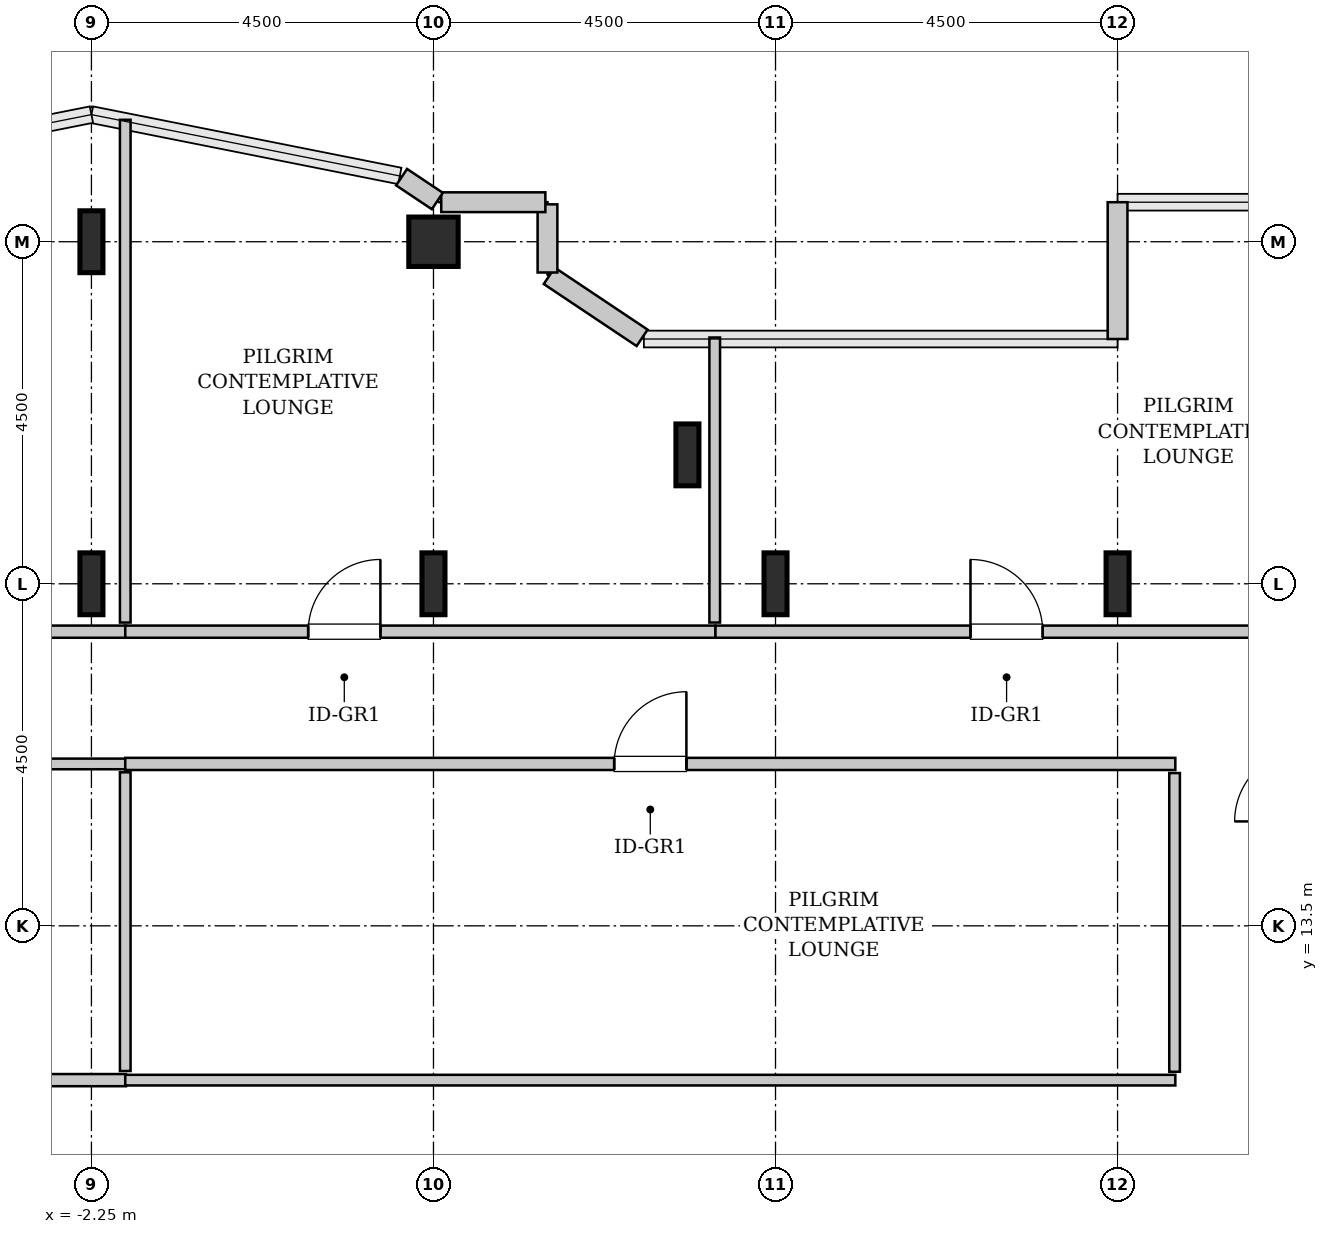
"""IFC4 building model, lengths in metres.
Left out: names, types, materials, properties, quantities, classifications, styles, units other than length and angle.
Written with IfcOpenShell. Run it as: python <this file> out.ifc"""

import sys

from ifc_helpers import new_model, si_unit, direction, frame, frame_2d, origin, origin_2d, place, context, subcontext, project, spatial, rectangle, hollow_rectangle, i_section, extrude, source, transform, mapped, element, fill, save


model = new_model("IFC4")
c1 = context("Model", 3, precision=1e-05, world=origin(), true_north=direction((0.0, 1.0)))
c2 = subcontext(c1, "Body", "Model", "MODEL_VIEW")
j1 = project(units=[si_unit("LENGTHUNIT", "METRE"), si_unit("PLANEANGLEUNIT", "RADIAN")], contexts=[c1])
p1 = place(None, origin())
s1 = spatial("IfcSite", under=j1, at=p1, CompositionType="ELEMENT")
p2 = place(p1, origin())
s2 = spatial("IfcBuilding", under=s1, at=p2, CompositionType="ELEMENT")
p3 = place(p2, frame((0.0, 0.0, 221.8)))
s3 = spatial("IfcBuildingStorey", under=s2, at=p3, CompositionType="ELEMENT", Elevation=221.8)
m1 = source(origin(), c2, "Body", "SweptSolid", [
    extrude(i_section(OverallWidth=0.303, OverallDepth=0.814, WebThickness=0.021, FlangeThickness=0.04, FilletRadius=0.03, at=origin_2d()), origin(), (0.0, 0.0, 1.0), 3.8),
])
for number, where, z_axis, x_axis in (
    (1, (-2.25, 18.0, 0.0), (0.0, 0.0, 1.0), (1.0, 0.0, 0.0)),
    (2, (-2.25, 22.5, 0.0), (0.0, 0.0, 1.0), (1.0, 0.0, 0.0)),
    (3, (2.25, 18.0, 0.0), (0.0, 0.0, 1.0), (1.0, 0.0, 0.0)),
):
    element("IfcColumn", number, at=place(p3, frame(where, z_axis=z_axis, x_axis=x_axis)), inside=s3, PredefinedType="COLUMN", context=c2, shape_type="MappedRepresentation", body=[
        mapped(m1, transform((0.0, 0.0, 0.0), x_axis=(1.0, 0.0, 0.0), y_axis=(0.0, 1.0, 0.0), z_axis=(0.0, 0.0, 1.0), scale=1.0)),
    ])
m2 = source(origin(), c2, "Body", "SweptSolid", [
    extrude(hollow_rectangle(XDim=0.65, YDim=0.65, WallThickness=0.032, InnerFilletRadius=0.032, OuterFilletRadius=0.064, at=origin_2d()), origin(), (0.0, 0.0, 1.0), 3.8),
])
p4 = place(p3, frame((2.25, 22.5, 0.0), z_axis=(0.0, 0.0, 1.0), x_axis=(1.0, 0.0, 0.0)))
e4 = element("IfcColumn", 4, at=p4, inside=s3, PredefinedType="COLUMN", context=c2, shape_type="MappedRepresentation", body=[
    mapped(m2, transform((0.0, 0.0, 0.0), x_axis=(1.0, 0.0, 0.0), y_axis=(0.0, 1.0, 0.0), z_axis=(0.0, 0.0, 1.0), scale=1.0)),
])
for number, where, z_axis, x_axis in (
    (5, (5.591, 19.696, 0.0), (0.0, 0.0, 1.0), (1.0, 0.0, 0.0)),
    (6, (6.75, 18.0, 0.0), (0.0, 0.0, 1.0), (1.0, 0.0, 0.0)),
    (7, (11.25, 18.0, 0.0), (0.0, 0.0, 1.0), (1.0, 0.0, 0.0)),
):
    element("IfcColumn", number, at=place(p3, frame(where, z_axis=z_axis, x_axis=x_axis)), inside=s3, PredefinedType="COLUMN", context=c2, shape_type="MappedRepresentation", body=[
        mapped(m1, transform((0.0, 0.0, 0.0), x_axis=(1.0, 0.0, 0.0), y_axis=(0.0, 1.0, 0.0), z_axis=(0.0, 0.0, 1.0), scale=1.0)),
    ])
m3 = source(origin(), c2, "Body", "SweptSolid", [
    extrude(rectangle(XDim=1.8, YDim=0.26, at=frame_2d((0.9, 0.0))), origin(), (0.0, 0.0, 1.0), 3.55),
])
p5 = place(p3, frame((11.25, 23.02, 0.0), z_axis=(0.0, 0.0, 1.0), x_axis=(0.0, -1.0, 0.0)))
e8 = element("IfcWall", 8, at=p5, inside=s3, PredefinedType="SOLIDWALL", context=c2, shape_type="MappedRepresentation", body=[
    mapped(m3, transform((0.0, 0.0, 0.0), x_axis=(1.0, 0.0, 0.0), y_axis=(0.0, 1.0, 0.0), z_axis=(0.0, 0.0, 1.0), scale=1.0)),
])
m4 = source(origin(), c2, "Body", "SweptSolid", [
    extrude(rectangle(XDim=1.469, YDim=0.26, at=frame_2d((0.734, 0.0))), origin(), (0.0, 0.0, 1.0), 3.55),
])
p6 = place(p3, frame((4.995, 21.236, 0.0), z_axis=(0.0, 0.0, 1.0), x_axis=(-0.831461760506, 0.555581983884, 0.0)))
e9 = element("IfcWall", 9, at=p6, inside=s3, PredefinedType="SOLIDWALL", context=c2, shape_type="MappedRepresentation", body=[
    mapped(m4, transform((0.0, 0.0, 0.0), x_axis=(1.0, 0.0, 0.0), y_axis=(0.0, 1.0, 0.0), z_axis=(0.0, 0.0, 1.0), scale=1.0)),
])
m5 = source(origin(), c2, "Body", "SweptSolid", [
    extrude(rectangle(XDim=0.897, YDim=0.26, at=frame_2d((0.448, 0.0))), origin(), (0.0, 0.0, 1.0), 3.55),
])
p7 = place(p3, frame((3.75, 22.095, 0.0), z_axis=(0.0, 0.0, 1.0), x_axis=(0.0, 1.0, 0.0)))
e10 = element("IfcWall", 10, at=p7, inside=s3, PredefinedType="SOLIDWALL", context=c2, shape_type="MappedRepresentation", body=[
    mapped(m5, transform((0.0, 0.0, 0.0), x_axis=(1.0, 0.0, 0.0), y_axis=(0.0, 1.0, 0.0), z_axis=(0.0, 0.0, 1.0), scale=1.0)),
])
m6 = source(origin(), c2, "Body", "SweptSolid", [
    extrude(rectangle(XDim=1.37, YDim=0.26, at=frame_2d((0.685, 0.0))), origin(), (0.0, 0.0, 1.0), 3.55),
])
p8 = place(p3, frame((3.722, 23.02, 0.0), z_axis=(0.0, 0.0, 1.0), x_axis=(-1.0, 0.0, 0.0)))
e11 = element("IfcWall", 11, at=p8, inside=s3, PredefinedType="SOLIDWALL", context=c2, shape_type="MappedRepresentation", body=[
    mapped(m6, transform((0.0, 0.0, 0.0), x_axis=(1.0, 0.0, 0.0), y_axis=(0.0, 1.0, 0.0), z_axis=(0.0, 0.0, 1.0), scale=1.0)),
])
m7 = source(origin(), c2, "Body", "SweptSolid", [
    extrude(rectangle(XDim=0.565, YDim=0.26, at=frame_2d((0.283, 0.0))), origin(), (0.0, 0.0, 1.0), 3.55),
])
p9 = place(p3, frame((2.301, 23.036, 0.0), z_axis=(0.0, 0.0, 1.0), x_axis=(-0.831651492666, 0.555297933317, 0.0)))
e12 = element("IfcWall", 12, at=p9, inside=s3, PredefinedType="SOLIDWALL", context=c2, shape_type="MappedRepresentation", body=[
    mapped(m7, transform((0.0, 0.0, 0.0), x_axis=(1.0, 0.0, 0.0), y_axis=(0.0, 1.0, 0.0), z_axis=(0.0, 0.0, 1.0), scale=1.0)),
])
m8 = source(origin(), c2, "Body", "SweptSolid", [
    extrude(rectangle(XDim=10.215, YDim=0.16, at=frame_2d((5.107, 0.0))), origin(), (0.0, 0.0, 1.0), 3.535),
])
p10 = place(p3, frame((-12.01, 11.47, 0.0), z_axis=(0.0, 0.0, 1.0), x_axis=(1.0, 0.0, 0.0)))
e13 = element("IfcWall", 13, at=p10, inside=s3, PredefinedType="PARTITIONING", context=c2, shape_type="MappedRepresentation", body=[
    mapped(m8, transform((0.0, 0.0, 0.0), x_axis=(1.0, 0.0, 0.0), y_axis=(0.0, 1.0, 0.0), z_axis=(0.0, 0.0, 1.0), scale=1.0)),
])
p11 = place(p10, frame((4.633, 0.0, 0.0)))
e14 = element("IfcOpeningElement", 14, at=p11, cuts=e13, PredefinedType="OPENING", context=c2, shape_type="SweptSolid", body=[
    extrude(rectangle(XDim=0.95, YDim=2.1, at=frame_2d((0.475, 1.05))), frame((0.0, 0.09, 0.0), z_axis=(0.0, -1.0, 0.0), x_axis=(1.0, 0.0, 0.0)), (0.0, 0.0, 1.0), 0.18),
])
m9 = source(origin(), c2, "Body", "SweptSolid", [
    extrude(rectangle(XDim=10.215, YDim=0.14, at=frame_2d((5.107, 0.0))), origin(), (0.0, 0.0, 1.0), 3.535),
])
p12 = place(p3, frame((-12.01, 15.63, 0.0), z_axis=(0.0, 0.0, 1.0), x_axis=(1.0, 0.0, 0.0)))
e15 = element("IfcWall", 15, at=p12, inside=s3, PredefinedType="PARTITIONING", context=c2, shape_type="MappedRepresentation", body=[
    mapped(m9, transform((0.0, 0.0, 0.0), x_axis=(1.0, 0.0, 0.0), y_axis=(0.0, 1.0, 0.0), z_axis=(0.0, 0.0, 1.0), scale=1.0)),
])
m10 = source(origin(), c2, "Body", "SweptSolid", [
    extrude(rectangle(XDim=3.93, YDim=0.14, at=frame_2d((1.965, 0.0))), origin(), (0.0, 0.0, 1.0), 3.535),
])
p13 = place(p3, frame((-1.805, 11.59, 0.0), z_axis=(0.0, 0.0, 1.0), x_axis=(0.0, 1.0, 0.0)))
e16 = element("IfcWall", 16, at=p13, inside=s3, PredefinedType="PARTITIONING", context=c2, shape_type="MappedRepresentation", body=[
    mapped(m10, transform((0.0, 0.0, 0.0), x_axis=(1.0, 0.0, 0.0), y_axis=(0.0, 1.0, 0.0), z_axis=(0.0, 0.0, 1.0), scale=1.0)),
])
m11 = source(origin(), c2, "Body", "SweptSolid", [
    extrude(rectangle(XDim=5.645, YDim=0.16, at=frame_2d((2.823, 0.0))), origin(), (0.0, 0.0, 1.0), 3.535),
])
p14 = place(p3, frame((-7.44, 17.37, 0.0), z_axis=(0.0, 0.0, 1.0), x_axis=(1.0, 0.0, 0.0)))
e17 = element("IfcWall", 17, at=p14, inside=s3, PredefinedType="PARTITIONING", context=c2, shape_type="MappedRepresentation", body=[
    mapped(m11, transform((0.0, 0.0, 0.0), x_axis=(1.0, 0.0, 0.0), y_axis=(0.0, 1.0, 0.0), z_axis=(0.0, 0.0, 1.0), scale=1.0)),
])
p15 = place(p14, frame((2.347, 0.0, 0.0)))
e18 = element("IfcOpeningElement", 18, at=p15, cuts=e17, PredefinedType="OPENING", context=c2, shape_type="SweptSolid", body=[
    extrude(rectangle(XDim=0.95, YDim=2.1, at=frame_2d((0.475, 1.05))), frame((0.0, 0.09, 0.0), z_axis=(0.0, -1.0, 0.0), x_axis=(1.0, 0.0, 0.0)), (0.0, 0.0, 1.0), 0.18),
])
m12 = source(origin(), c2, "Body", "SweptSolid", [
    extrude(rectangle(XDim=6.614, YDim=0.14, at=frame_2d((3.307, 0.0))), origin(), (0.0, 0.0, 1.0), 2.925),
])
p16 = place(p3, frame((-1.805, 17.49, 0.0), z_axis=(0.0, 0.0, 1.0), x_axis=(0.0, 1.0, 0.0)))
e19 = element("IfcWall", 19, at=p16, inside=s3, PredefinedType="PARTITIONING", context=c2, shape_type="MappedRepresentation", body=[
    mapped(m12, transform((0.0, 0.0, 0.0), x_axis=(1.0, 0.0, 0.0), y_axis=(0.0, 1.0, 0.0), z_axis=(0.0, 0.0, 1.0), scale=1.0)),
])
m13 = source(origin(), c2, "Body", "SweptSolid", [
    extrude(rectangle(XDim=7.765, YDim=0.16, at=frame_2d((3.882, 0.0))), origin(), (0.0, 0.0, 1.0), 3.535),
])
p17 = place(p3, frame((-1.805, 17.37, 0.0), z_axis=(0.0, 0.0, 1.0), x_axis=(1.0, 0.0, 0.0)))
e20 = element("IfcWall", 20, at=p17, inside=s3, PredefinedType="PARTITIONING", context=c2, shape_type="MappedRepresentation", body=[
    mapped(m13, transform((0.0, 0.0, 0.0), x_axis=(1.0, 0.0, 0.0), y_axis=(0.0, 1.0, 0.0), z_axis=(0.0, 0.0, 1.0), scale=1.0)),
])
p18 = place(p17, frame((2.407, 0.0, 0.0)))
e21 = element("IfcOpeningElement", 21, at=p18, cuts=e20, PredefinedType="OPENING", context=c2, shape_type="SweptSolid", body=[
    extrude(rectangle(XDim=0.95, YDim=2.1, at=frame_2d((0.475, 1.05))), frame((0.0, 0.09, 0.0), z_axis=(0.0, -1.0, 0.0), x_axis=(1.0, 0.0, 0.0)), (0.0, 0.0, 1.0), 0.18),
])
m14 = source(origin(), c2, "Body", "SweptSolid", [
    extrude(rectangle(XDim=3.75, YDim=0.14, at=frame_2d((1.875, 0.0))), origin(), (0.0, 0.0, 1.0), 3.535),
])
p19 = place(p3, frame((5.95, 17.49, 0.0), z_axis=(0.0, 0.0, 1.0), x_axis=(0.0, 1.0, 0.0)))
e22 = element("IfcWall", 22, at=p19, inside=s3, PredefinedType="PARTITIONING", context=c2, shape_type="MappedRepresentation", body=[
    mapped(m14, transform((0.0, 0.0, 0.0), x_axis=(1.0, 0.0, 0.0), y_axis=(0.0, 1.0, 0.0), z_axis=(0.0, 0.0, 1.0), scale=1.0)),
])
m15 = source(origin(), c2, "Body", "SweptSolid", [
    extrude(rectangle(XDim=7.66, YDim=0.16, at=frame_2d((3.83, 0.0))), origin(), (0.0, 0.0, 1.0), 3.535),
])
p20 = place(p3, frame((5.96, 17.37, 0.0), z_axis=(0.0, 0.0, 1.0), x_axis=(1.0, 0.0, 0.0)))
e23 = element("IfcWall", 23, at=p20, inside=s3, PredefinedType="PARTITIONING", context=c2, shape_type="MappedRepresentation", body=[
    mapped(m15, transform((0.0, 0.0, 0.0), x_axis=(1.0, 0.0, 0.0), y_axis=(0.0, 1.0, 0.0), z_axis=(0.0, 0.0, 1.0), scale=1.0)),
])
p21 = place(p20, frame((3.355, 0.0, 0.0)))
e24 = element("IfcOpeningElement", 24, at=p21, cuts=e23, PredefinedType="OPENING", context=c2, shape_type="SweptSolid", body=[
    extrude(rectangle(XDim=0.95, YDim=2.1, at=frame_2d((0.475, 1.05))), frame((0.0, 0.09, 0.0), z_axis=(0.0, -1.0, 0.0), x_axis=(1.0, 0.0, 0.0)), (0.0, 0.0, 1.0), 0.18),
])
m16 = source(origin(), c2, "Body", "SweptSolid", [
    extrude(rectangle(XDim=13.815, YDim=0.16, at=frame_2d((6.907, 0.0))), origin(), (0.0, 0.0, 1.0), 3.535),
])
p22 = place(p3, frame((-1.805, 15.63, 0.0), z_axis=(0.0, 0.0, 1.0), x_axis=(1.0, 0.0, 0.0)))
e25 = element("IfcWall", 25, at=p22, inside=s3, PredefinedType="PARTITIONING", context=c2, shape_type="MappedRepresentation", body=[
    mapped(m16, transform((0.0, 0.0, 0.0), x_axis=(1.0, 0.0, 0.0), y_axis=(0.0, 1.0, 0.0), z_axis=(0.0, 0.0, 1.0), scale=1.0)),
])
p23 = place(p22, frame((6.433, 0.0, 0.0)))
e26 = element("IfcOpeningElement", 26, at=p23, cuts=e25, PredefinedType="OPENING", context=c2, shape_type="SweptSolid", body=[
    extrude(rectangle(XDim=0.95, YDim=2.1, at=frame_2d((0.475, 1.05))), frame((0.0, 0.09, 0.0), z_axis=(0.0, -1.0, 0.0), x_axis=(1.0, 0.0, 0.0)), (0.0, 0.0, 1.0), 0.18),
])
m17 = source(origin(), c2, "Body", "SweptSolid", [
    extrude(rectangle(XDim=13.815, YDim=0.14, at=frame_2d((6.907, 0.0))), origin(), (0.0, 0.0, 1.0), 3.535),
])
p24 = place(p3, frame((-1.805, 11.47, 0.0), z_axis=(0.0, 0.0, 1.0), x_axis=(1.0, 0.0, 0.0)))
e27 = element("IfcWall", 27, at=p24, inside=s3, PredefinedType="PARTITIONING", context=c2, shape_type="MappedRepresentation", body=[
    mapped(m17, transform((0.0, 0.0, 0.0), x_axis=(1.0, 0.0, 0.0), y_axis=(0.0, 1.0, 0.0), z_axis=(0.0, 0.0, 1.0), scale=1.0)),
])
p25 = place(p3, frame((12.0, 11.58, 0.0), z_axis=(0.0, 0.0, 1.0), x_axis=(0.0, 1.0, 0.0)))
e28 = element("IfcWall", 28, at=p25, inside=s3, PredefinedType="PARTITIONING", context=c2, shape_type="MappedRepresentation", body=[
    mapped(m10, transform((0.0, 0.0, 0.0), x_axis=(1.0, 0.0, 0.0), y_axis=(0.0, 1.0, 0.0), z_axis=(0.0, 0.0, 1.0), scale=1.0)),
])
m18 = source(origin(), c2, "Body", "SweptSolid", [
    extrude(rectangle(XDim=0.95, YDim=2.1, at=frame_2d((0.475, 1.05))), frame((0.0, 0.025, 0.0), z_axis=(0.0, -1.0, 0.0), x_axis=(1.0, 0.0, 0.0)), (0.0, 0.0, 1.0), 0.05),
])
p26 = place(p18, origin())
e29 = element("IfcDoor", 29, at=p26, inside=s3, OperationType="SINGLE_SWING_RIGHT", PredefinedType="DOOR", context=c2, shape_type="MappedRepresentation", body=[
    mapped(m18, transform((0.0, 0.0, 0.0), x_axis=(1.0, 0.0, 0.0), y_axis=(0.0, 1.0, 0.0), z_axis=(0.0, 0.0, 1.0), scale=1.0)),
])
fill(e21, e29)
p27 = place(p21, origin())
e30 = element("IfcDoor", 30, at=p27, inside=s3, OperationType="SINGLE_SWING_LEFT", PredefinedType="DOOR", context=c2, shape_type="MappedRepresentation", body=[
    mapped(m18, transform((0.0, 0.0, 0.0), x_axis=(1.0, 0.0, 0.0), y_axis=(0.0, 1.0, 0.0), z_axis=(0.0, 0.0, 1.0), scale=1.0)),
])
fill(e24, e30)
p28 = place(p23, origin())
e31 = element("IfcDoor", 31, at=p28, inside=s3, OperationType="SINGLE_SWING_RIGHT", PredefinedType="DOOR", context=c2, shape_type="MappedRepresentation", body=[
    mapped(m18, transform((0.0, 0.0, 0.0), x_axis=(1.0, 0.0, 0.0), y_axis=(0.0, 1.0, 0.0), z_axis=(0.0, 0.0, 1.0), scale=1.0)),
])
fill(e26, e31)
save(model, sys.argv[1])
